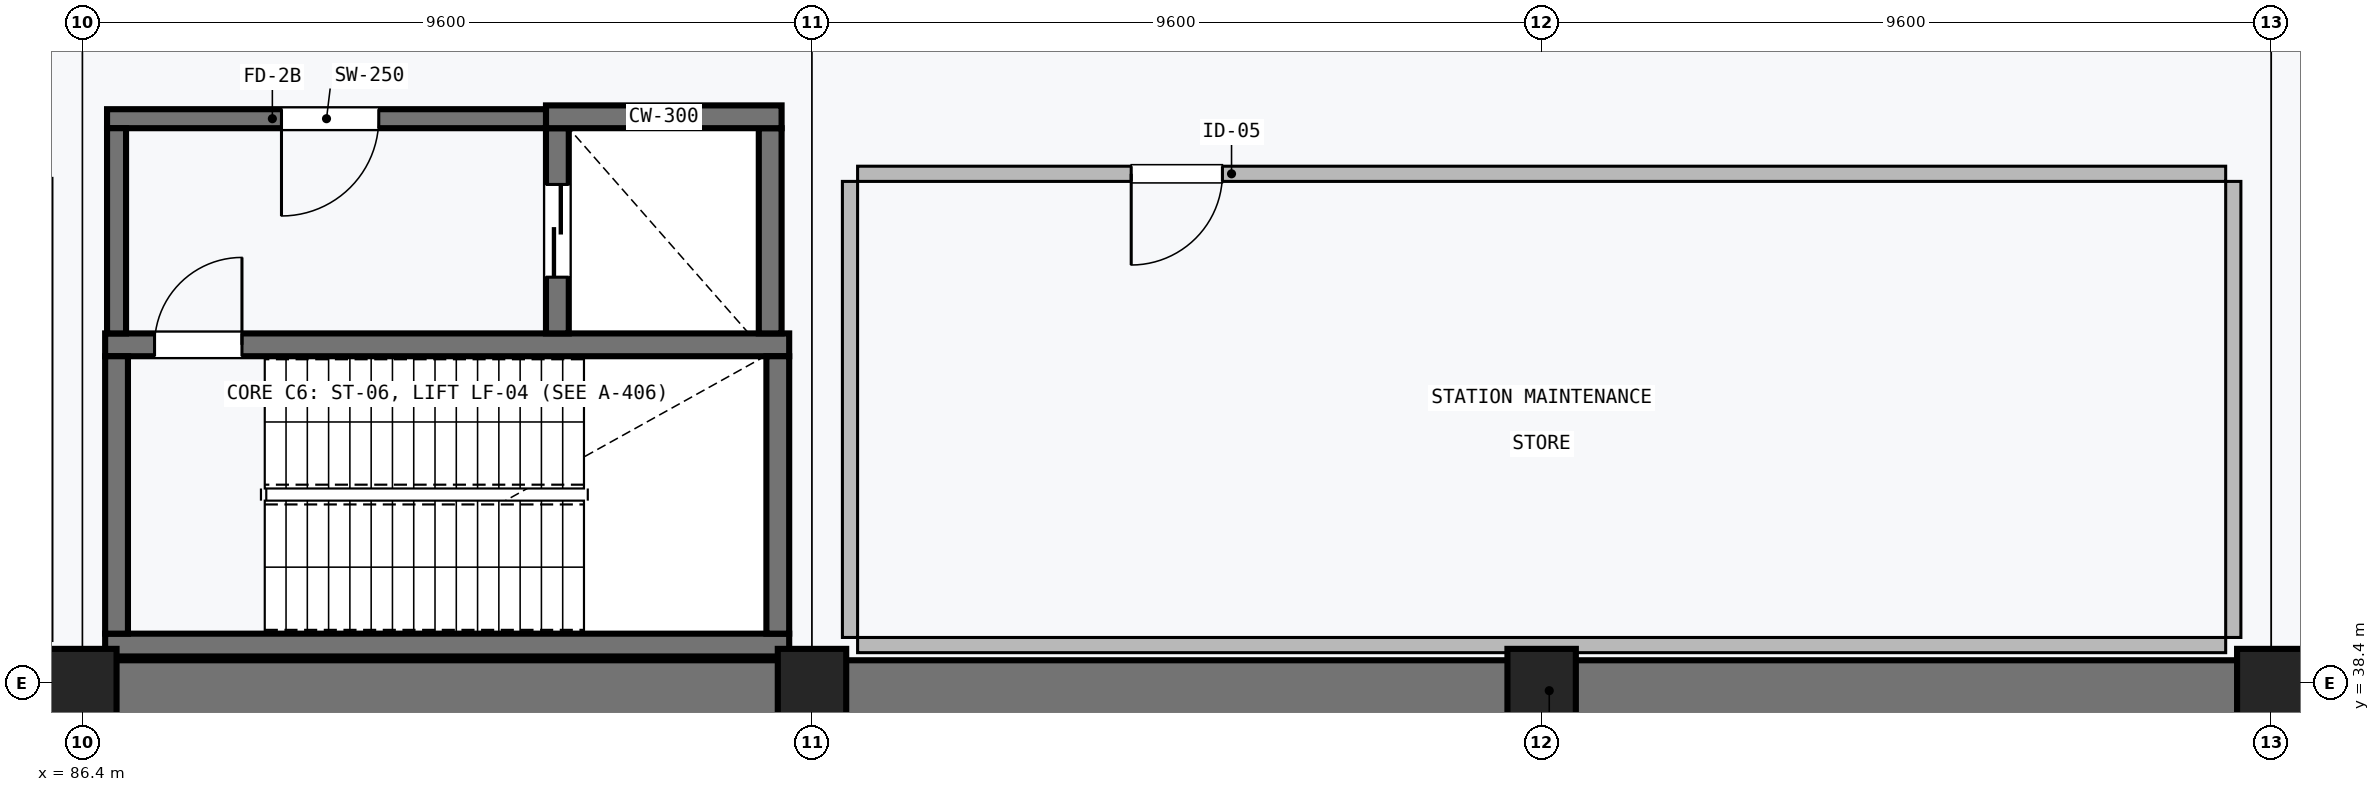
"""IFC4 building model, lengths in metres.
Left out: names, types, materials, properties, quantities, classifications, styles, units other than length and angle.
Written with IfcOpenShell. Run it as: python <this file> out.ifc"""

import sys

from ifc_helpers import new_model, si_unit, direction, frame, frame_2d, origin, origin_2d, place, context, subcontext, project, spatial, rectangle, extrude, element, fill, save


model = new_model("IFC4")
c1 = context("Model", 3, precision=1e-05, world=origin(), true_north=direction((0.0, 1.0)))
c2 = subcontext(c1, "Body", "Model", "MODEL_VIEW")
j1 = project(units=[si_unit("LENGTHUNIT", "METRE"), si_unit("PLANEANGLEUNIT", "RADIAN")], contexts=[c1])
p1 = place(None, origin())
s1 = spatial("IfcSite", under=j1, at=p1, CompositionType="ELEMENT")
p2 = place(p1, origin())
s2 = spatial("IfcBuilding", under=s1, at=p2, CompositionType="ELEMENT")
p3 = place(p2, frame((0.0, 0.0, -5.4)))
s3 = spatial("IfcBuildingStorey", under=s2, at=p3, CompositionType="ELEMENT", Elevation=-5.4)
p4 = place(p3, frame((153.7, 38.3, 0.0), z_axis=(0.0, 0.0, 1.0), x_axis=(-1.0, 0.0, 0.0)))
e1 = element("IfcWall", 1, at=p4, inside=s3, PredefinedType="SOLIDWALL", context=c2, shape_type="SweptSolid", body=[
    extrude(rectangle(XDim=96.0, YDim=0.8, at=frame_2d((48.0, 0.0))), origin(), (0.0, 0.0, 1.0), 5.0),
])
for number, where, z_axis, x_axis in (
    (2, (86.4, 38.4, 0.0), (0.0, 0.0, 1.0), (1.0, 0.0, 0.0)),
    (3, (96.0, 38.4, 0.0), (0.0, 0.0, 1.0), (1.0, 0.0, 0.0)),
    (4, (105.6, 38.4, 0.0), (0.0, 0.0, 1.0), (1.0, 0.0, 0.0)),
    (5, (115.2, 38.4, 0.0), (0.0, 0.0, 1.0), (1.0, 0.0, 0.0)),
):
    element("IfcColumn", number, at=place(p3, frame(where, z_axis=z_axis, x_axis=x_axis)), inside=s3, PredefinedType="COLUMN", context=c2, shape_type="SweptSolid", body=[
        extrude(rectangle(XDim=0.9, YDim=0.9, at=origin_2d()), origin(), (0.0, 0.0, 1.0), 5.0),
    ])
p5 = place(p3, frame((86.7, 38.9, 0.0), z_axis=(0.0, 0.0, 1.0), x_axis=(1.0, 0.0, 0.0)))
e6 = element("IfcWall", 6, at=p5, inside=s3, PredefinedType="SHEAR", context=c2, shape_type="SweptSolid", body=[
    extrude(rectangle(XDim=9.0, YDim=0.3, at=frame_2d((4.5, 0.0))), origin(), (0.0, 0.0, 1.0), 5.0),
])
p6 = place(p3, frame((95.7, 42.85, 0.0), z_axis=(0.0, 0.0, 1.0), x_axis=(-1.0, 0.0, 0.0)))
e7 = element("IfcWall", 7, at=p6, inside=s3, PredefinedType="SHEAR", context=c2, shape_type="SweptSolid", body=[
    extrude(rectangle(XDim=9.0, YDim=0.3, at=frame_2d((4.5, 0.0))), origin(), (0.0, 0.0, 1.0), 5.0),
])
p7 = place(p6, frame((7.2, 0.0, 0.0)))
e8 = element("IfcOpeningElement", 8, at=p7, cuts=e7, PredefinedType="OPENING", context=c2, shape_type="SweptSolid", body=[
    extrude(rectangle(XDim=1.15, YDim=2.15, at=frame_2d((0.575, 1.075))), frame((0.0, 0.16, 0.0), z_axis=(0.0, -1.0, 0.0), x_axis=(1.0, 0.0, 0.0)), (0.0, 0.0, 1.0), 0.32),
])
for number, where, z_axis, x_axis in (
    (9, (86.85, 39.05, 0.0), (0.0, 0.0, 1.0), (0.0, 1.0, 0.0)),
    (10, (95.55, 42.7, 0.0), (0.0, 0.0, 1.0), (0.0, -1.0, 0.0)),
):
    element("IfcWall", number, at=place(p3, frame(where, z_axis=z_axis, x_axis=x_axis)), inside=s3, PredefinedType="SHEAR", context=c2, shape_type="SweptSolid", body=[
        extrude(rectangle(XDim=3.65, YDim=0.3, at=frame_2d((1.825, 0.0))), origin(), (0.0, 0.0, 1.0), 5.0),
    ])
p8 = place(p3, frame((92.65, 45.7, 0.0), z_axis=(0.0, 0.0, 1.0), x_axis=(0.0, -1.0, 0.0)))
e11 = element("IfcWall", 11, at=p8, inside=s3, PredefinedType="SHEAR", context=c2, shape_type="SweptSolid", body=[
    extrude(rectangle(XDim=2.7, YDim=0.3, at=frame_2d((1.35, 0.0))), origin(), (0.0, 0.0, 1.0), 5.0),
])
p9 = place(p8, frame((0.74, 0.0, 0.0)))
e12 = element("IfcOpeningElement", 12, at=p9, cuts=e11, PredefinedType="OPENING", context=c2, shape_type="SweptSolid", body=[
    extrude(rectangle(XDim=1.22, YDim=2.15, at=frame_2d((0.61, 1.075))), frame((0.0, 0.16, 0.0), z_axis=(0.0, -1.0, 0.0), x_axis=(1.0, 0.0, 0.0)), (0.0, 0.0, 1.0), 0.32),
])
p10 = place(p3, frame((95.45, 43.0, 0.0), z_axis=(0.0, 0.0, 1.0), x_axis=(0.0, 1.0, 0.0)))
e13 = element("IfcWall", 13, at=p10, inside=s3, PredefinedType="SHEAR", context=c2, shape_type="SweptSolid", body=[
    extrude(rectangle(XDim=2.7, YDim=0.3, at=frame_2d((1.35, 0.0))), origin(), (0.0, 0.0, 1.0), 5.0),
])
p11 = place(p3, frame((92.5, 45.85, 0.0), z_axis=(0.0, 0.0, 1.0), x_axis=(1.0, 0.0, 0.0)))
e14 = element("IfcWall", 14, at=p11, inside=s3, PredefinedType="SHEAR", context=c2, shape_type="SweptSolid", body=[
    extrude(rectangle(XDim=3.1, YDim=0.3, at=frame_2d((1.55, 0.0))), origin(), (0.0, 0.0, 1.0), 5.0),
])
p12 = place(p3, frame((92.5, 45.825, 0.0), z_axis=(0.0, 0.0, 1.0), x_axis=(-1.0, 0.0, 0.0)))
e15 = element("IfcWall", 15, at=p12, inside=s3, PredefinedType="SHEAR", context=c2, shape_type="SweptSolid", body=[
    extrude(rectangle(XDim=5.775, YDim=0.25, at=frame_2d((2.887, 0.0))), origin(), (0.0, 0.0, 1.0), 5.0),
])
p13 = place(p12, frame((2.2, 0.0, 0.0)))
e16 = element("IfcOpeningElement", 16, at=p13, cuts=e15, PredefinedType="OPENING", context=c2, shape_type="SweptSolid", body=[
    extrude(rectangle(XDim=1.28, YDim=2.2, at=frame_2d((0.64, 1.1))), frame((0.0, 0.135, 0.0), z_axis=(0.0, -1.0, 0.0), x_axis=(1.0, 0.0, 0.0)), (0.0, 0.0, 1.0), 0.27),
])
p14 = place(p3, frame((86.85, 43.0, 0.0), z_axis=(0.0, 0.0, 1.0), x_axis=(0.0, 1.0, 0.0)))
e17 = element("IfcWall", 17, at=p14, inside=s3, PredefinedType="SHEAR", context=c2, shape_type="SweptSolid", body=[
    extrude(rectangle(XDim=2.7, YDim=0.25, at=frame_2d((1.35, 0.0))), origin(), (0.0, 0.0, 1.0), 5.0),
])
p15 = place(p3, frame((114.6, 38.9, 0.0), z_axis=(0.0, 0.0, 1.0), x_axis=(-1.0, 0.0, 0.0)))
e18 = element("IfcWall", 18, at=p15, inside=s3, PredefinedType="PARTITIONING", context=c2, shape_type="SweptSolid", body=[
    extrude(rectangle(XDim=18.0, YDim=0.2, at=frame_2d((9.0, 0.0))), origin(), (0.0, 0.0, 1.0), 3.99),
])
p16 = place(p3, frame((96.6, 45.1, 0.0), z_axis=(0.0, 0.0, 1.0), x_axis=(1.0, 0.0, 0.0)))
e19 = element("IfcWall", 19, at=p16, inside=s3, PredefinedType="PARTITIONING", context=c2, shape_type="SweptSolid", body=[
    extrude(rectangle(XDim=18.0, YDim=0.2, at=frame_2d((9.0, 0.0))), origin(), (0.0, 0.0, 1.0), 3.99),
])
p17 = place(p16, frame((3.6, 0.0, 0.0)))
e20 = element("IfcOpeningElement", 20, at=p17, cuts=e19, PredefinedType="OPENING", context=c2, shape_type="SweptSolid", body=[
    extrude(rectangle(XDim=1.2, YDim=2.2, at=frame_2d((0.6, 1.1))), frame((0.0, 0.11, 0.0), z_axis=(0.0, -1.0, 0.0), x_axis=(1.0, 0.0, 0.0)), (0.0, 0.0, 1.0), 0.22),
])
for number, where, z_axis, x_axis in (
    (21, (96.5, 39.0, 0.0), (0.0, 0.0, 1.0), (0.0, 1.0, 0.0)),
    (22, (114.7, 45.0, 0.0), (0.0, 0.0, 1.0), (0.0, -1.0, 0.0)),
):
    element("IfcWall", number, at=place(p3, frame(where, z_axis=z_axis, x_axis=x_axis)), inside=s3, PredefinedType="PARTITIONING", context=c2, shape_type="SweptSolid", body=[
        extrude(rectangle(XDim=6.0, YDim=0.2, at=frame_2d((3.0, 0.0))), origin(), (0.0, 0.0, 1.0), 4.38),
    ])
p18 = place(p7, frame((1.15, 0.0, 0.0), z_axis=(0.0, 0.0, 1.0), x_axis=(-1.0, 0.0, 0.0)))
e23 = element("IfcDoor", 23, at=p18, inside=s3, OperationType="SINGLE_SWING_LEFT", PredefinedType="DOOR", context=c2, shape_type="SweptSolid", body=[
    extrude(rectangle(XDim=1.15, YDim=2.15, at=frame_2d((0.575, 1.075))), frame((0.0, 0.025, 0.0), z_axis=(0.0, -1.0, 0.0), x_axis=(1.0, 0.0, 0.0)), (0.0, 0.0, 1.0), 0.05),
])
fill(e8, e23)
p19 = place(p9, frame((1.22, 0.0, 0.0), z_axis=(0.0, 0.0, 1.0), x_axis=(-1.0, 0.0, 0.0)))
e24 = element("IfcDoor", 24, at=p19, inside=s3, OperationType="DOUBLE_DOOR_SLIDING", PredefinedType="DOOR", context=c2, shape_type="SweptSolid", body=[
    extrude(rectangle(XDim=1.22, YDim=2.15, at=frame_2d((0.61, 1.075))), frame((0.0, 0.025, 0.0), z_axis=(0.0, -1.0, 0.0), x_axis=(1.0, 0.0, 0.0)), (0.0, 0.0, 1.0), 0.05),
])
fill(e12, e24)
p20 = place(p13, origin())
e25 = element("IfcDoor", 25, at=p20, inside=s3, OperationType="SINGLE_SWING_RIGHT", PredefinedType="DOOR", context=c2, shape_type="SweptSolid", body=[
    extrude(rectangle(XDim=1.28, YDim=2.2, at=frame_2d((0.64, 1.1))), frame((0.0, 0.025, 0.0), z_axis=(0.0, -1.0, 0.0), x_axis=(1.0, 0.0, 0.0)), (0.0, 0.0, 1.0), 0.05),
])
fill(e16, e25)
p21 = place(p17, frame((1.2, 0.0, 0.0), z_axis=(0.0, 0.0, 1.0), x_axis=(-1.0, 0.0, 0.0)))
e26 = element("IfcDoor", 26, at=p21, inside=s3, OperationType="SINGLE_SWING_LEFT", PredefinedType="DOOR", context=c2, shape_type="SweptSolid", body=[
    extrude(rectangle(XDim=1.2, YDim=2.2, at=frame_2d((0.6, 1.1))), frame((0.0, 0.025, 0.0), z_axis=(0.0, -1.0, 0.0), x_axis=(1.0, 0.0, 0.0)), (0.0, 0.0, 1.0), 0.05),
])
fill(e20, e26)
save(model, sys.argv[1])
